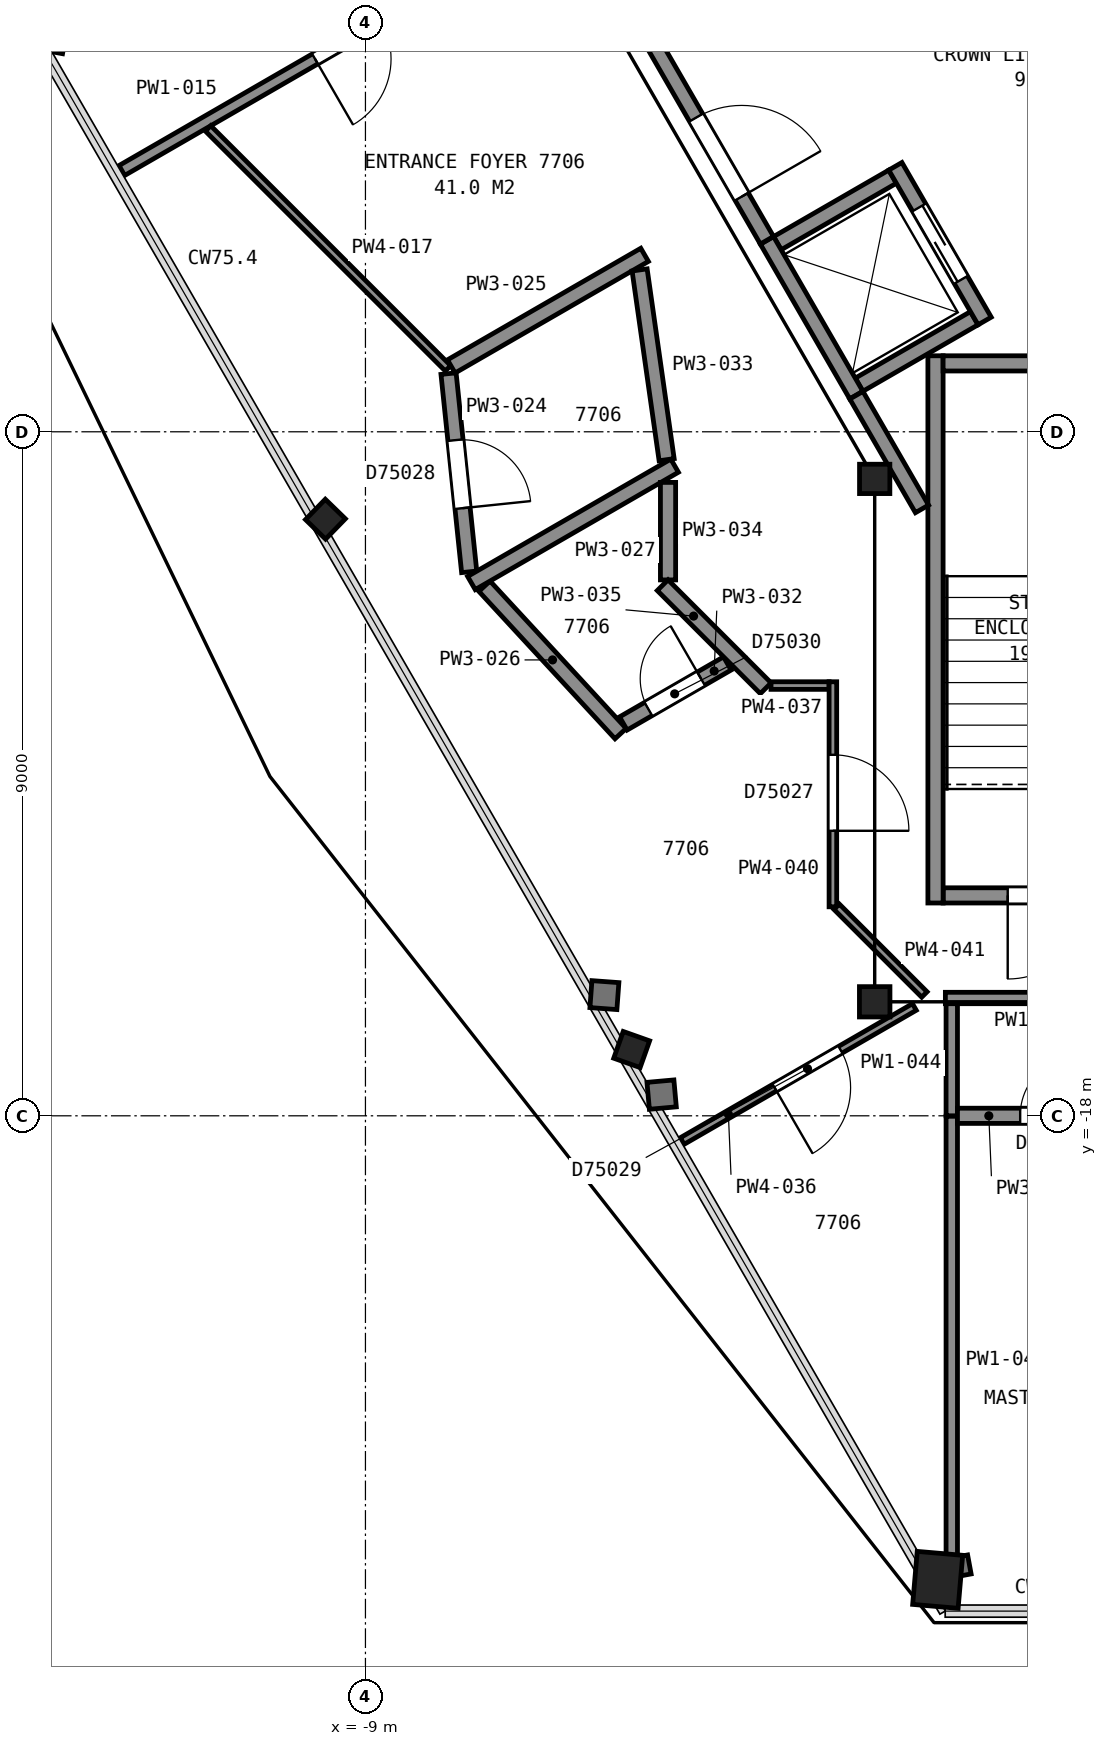
"""IFC4 building model, lengths in metres.
Left out: names, types, materials, properties, quantities, classifications, styles, units other than length and angle.
Written with IfcOpenShell. Run it as: python <this file> out.ifc"""

import sys

from ifc_helpers import new_model, si_unit, direction, frame, frame_2d, origin, origin_2d, place, context, subcontext, project, spatial, rectangle, hollow_rectangle, i_section, extrude, element, fill, save


model = new_model("IFC4")
c1 = context("Model", 3, precision=1e-05, world=origin(), true_north=direction((0.0, 1.0)))
c2 = subcontext(c1, "Body", "Model", "MODEL_VIEW")
j1 = project(units=[si_unit("LENGTHUNIT", "METRE"), si_unit("PLANEANGLEUNIT", "RADIAN")], contexts=[c1])
p1 = place(None, origin())
s1 = spatial("IfcSite", under=j1, at=p1, CompositionType="ELEMENT")
p2 = place(p1, origin())
s2 = spatial("IfcBuilding", under=s1, at=p2, CompositionType="ELEMENT")
p3 = place(p2, frame((0.0, 0.0, 304.7)))
s3 = spatial("IfcBuildingStorey", under=s2, at=p3, CompositionType="ELEMENT", Elevation=304.7)
p4 = place(p3, frame((-9.751, -10.381, 0.045), z_axis=(0.187414704281, 0.192691239229, 0.963195626518), x_axis=(-0.498724706912, 0.863448717299, -0.075696626808)))
e1 = element("IfcColumn", 1, at=p4, inside=s3, PredefinedType="COLUMN", context=c2, shape_type="SweptSolid", body=[
    extrude(i_section(OverallWidth=0.373, OverallDepth=0.368, WebThickness=0.015, FlangeThickness=0.024, FilletRadius=0.015, at=origin_2d()), origin(), (0.0, 0.0, 1.0), 3.748),
])
p5 = place(p3, frame((-5.634, -17.512, 0.055), z_axis=(0.112062196474, 0.31581164461, 0.942181017242), x_axis=(-0.487199113903, 0.843834781896, -0.224899720486)))
e2 = element("IfcColumn", 2, at=p5, inside=s3, PredefinedType="COLUMN", context=c2, shape_type="SweptSolid", body=[
    extrude(i_section(OverallWidth=0.373, OverallDepth=0.368, WebThickness=0.015, FlangeThickness=0.024, FilletRadius=0.015, at=origin_2d()), origin(), (0.0, 0.0, 1.0), 3.81),
])
p6 = place(p3, frame((-1.516, -24.628, 0.09), z_axis=(0.0366924906, 0.425256557728, 0.904328768337), x_axis=(-0.9991793096, 7.5297509e-05, 0.040505574907)))
e3 = element("IfcColumn", 3, at=p6, inside=s3, PredefinedType="COLUMN", context=c2, shape_type="SweptSolid", body=[
    extrude(hollow_rectangle(XDim=0.6, YDim=0.7, WallThickness=0.04, at=origin_2d()), origin(), (0.0, 0.0, 1.0), 3.892),
])
p7 = place(p3, frame((-2.3, -9.62, 0.0), z_axis=(0.0, 0.0, 1.0), x_axis=(1.0, 0.0, 0.0)))
e4 = element("IfcColumn", 4, at=p7, inside=s3, PredefinedType="COLUMN", context=c2, shape_type="SweptSolid", body=[
    extrude(i_section(OverallWidth=0.399, OverallDepth=0.386, WebThickness=0.021, FlangeThickness=0.033, FilletRadius=0.015, at=origin_2d()), origin(), (0.0, 0.0, 1.0), 3.7),
])
p8 = place(p3, frame((-2.3, -16.5, 0.0), z_axis=(0.0, 0.0, 1.0), x_axis=(-1.0, 0.0, 0.0)))
e5 = element("IfcColumn", 5, at=p8, inside=s3, PredefinedType="COLUMN", context=c2, shape_type="SweptSolid", body=[
    extrude(i_section(OverallWidth=0.401, OverallDepth=0.399, WebThickness=0.025, FlangeThickness=0.04, FilletRadius=0.015, at=origin_2d()), origin(), (0.0, 0.0, 1.0), 3.7),
])
p9 = place(p3, frame((-1.4, -15.1, 0.0), z_axis=(0.0, 0.0, 1.0), x_axis=(1.0, 0.0, 0.0)))
e6 = element("IfcWall", 6, at=p9, inside=s3, PredefinedType="PARTITIONING", context=c2, shape_type="SweptSolid", body=[
    extrude(rectangle(XDim=2.8, YDim=0.2, at=frame_2d((1.4, 0.0))), origin(), (0.0, 0.0, 1.0), 3.45),
])
p10 = place(p9, frame((0.85, 0.0, 0.0)))
e7 = element("IfcOpeningElement", 7, at=p10, cuts=e6, PredefinedType="OPENING", context=c2, shape_type="SweptSolid", body=[
    extrude(rectangle(XDim=1.1, YDim=2.1, at=frame_2d((0.55, 1.05))), frame((0.0, 0.11, 0.0), z_axis=(0.0, -1.0, 0.0), x_axis=(1.0, 0.0, 0.0)), (0.0, 0.0, 1.0), 0.22),
])
p11 = place(p3, frame((-1.5, -8.0, 0.0), z_axis=(0.0, 0.0, 1.0), x_axis=(0.0, -1.0, 0.0)))
e8 = element("IfcWall", 8, at=p11, inside=s3, PredefinedType="PARTITIONING", context=c2, shape_type="SweptSolid", body=[
    extrude(rectangle(XDim=7.2, YDim=0.2, at=frame_2d((3.6, 0.0))), origin(), (0.0, 0.0, 1.0), 3.45),
])
p12 = place(p3, frame((-1.4, -8.1, 0.0), z_axis=(0.0, 0.0, 1.0), x_axis=(1.0, 0.0, 0.0)))
e9 = element("IfcWall", 9, at=p12, inside=s3, PredefinedType="PARTITIONING", context=c2, shape_type="SweptSolid", body=[
    extrude(rectangle(XDim=2.8, YDim=0.2, at=frame_2d((1.4, 0.0))), origin(), (0.0, 0.0, 1.0), 3.45),
])
for number, where, z_axis, x_axis in (
    (10, (-2.505, -8.38, 0.0), (0.0, 0.0, 1.0), (0.866, 0.5, 0.0)),
    (11, (-3.58, -6.519, 0.0), (0.0, 0.0, 1.0), (0.866, 0.5, 0.0)),
):
    element("IfcWall", number, at=place(p3, frame(where, z_axis=z_axis, x_axis=x_axis)), inside=s3, PredefinedType="PARTITIONING", context=c2, shape_type="SweptSolid", body=[
        extrude(rectangle(XDim=1.75, YDim=0.2, at=frame_2d((0.875, 0.0))), origin(), (0.0, 0.0, 1.0), 3.7),
    ])
p13 = place(p3, frame((-0.853, -7.542, 0.0), z_axis=(0.0, 0.0, 1.0), x_axis=(-0.500016218704, 0.866016039709, 0.0)))
e12 = element("IfcWall", 12, at=p13, inside=s3, PredefinedType="PARTITIONING", context=c2, shape_type="SweptSolid", body=[
    extrude(rectangle(XDim=2.35, YDim=0.2, at=frame_2d((1.175, 0.0))), origin(), (0.0, 0.0, 1.0), 3.7),
])
p14 = place(p13, frame((0.625, 0.0, 0.0)))
e13 = element("IfcOpeningElement", 13, at=p14, cuts=e12, PredefinedType="OPENING", context=c2, shape_type="SweptSolid", body=[
    extrude(rectangle(XDim=1.1, YDim=2.1, at=frame_2d((0.55, 1.05))), frame((0.0, 0.11, 0.0), z_axis=(0.0, -1.0, 0.0), x_axis=(1.0, 0.0, 0.0)), (0.0, 0.0, 1.0), 0.22),
])
p15 = place(p3, frame((-2.542, -8.517, 0.0), z_axis=(0.0, 0.0, 1.0), x_axis=(-0.500016218704, 0.866016039709, 0.0)))
e14 = element("IfcWall", 14, at=p15, inside=s3, PredefinedType="PARTITIONING", context=c2, shape_type="SweptSolid", body=[
    extrude(rectangle(XDim=2.35, YDim=0.2, at=frame_2d((1.175, 0.0))), origin(), (0.0, 0.0, 1.0), 3.7),
])
p16 = place(p3, frame((-7.141, -0.551, 0.0), z_axis=(0.0, 0.0, 1.0), x_axis=(0.500001302854, -0.86602465158, 0.0)))
e15 = element("IfcWall", 15, at=p16, inside=s3, PredefinedType="PARTITIONING", context=c2, shape_type="SweptSolid", body=[
    extrude(rectangle(XDim=6.846, YDim=0.2, at=frame_2d((3.423, 0.0))), origin(), (0.0, 0.0, 1.0), 3.45),
])
p17 = place(p16, frame((4.983, 0.0, 0.0)))
e16 = element("IfcOpeningElement", 16, at=p17, cuts=e15, PredefinedType="OPENING", context=c2, shape_type="SweptSolid", body=[
    extrude(rectangle(XDim=1.2, YDim=2.1, at=frame_2d((0.6, 1.05))), frame((0.0, 0.11, 0.0), z_axis=(0.0, -1.0, 0.0), x_axis=(1.0, 0.0, 0.0)), (0.0, 0.0, 1.0), 0.22),
])
p18 = place(p3, frame((-2.541, -8.519, 0.0), z_axis=(0.0, 0.0, 1.0), x_axis=(0.500016142392, -0.86601608377, 0.0)))
e17 = element("IfcWall", 17, at=p18, inside=s3, PredefinedType="PARTITIONING", context=c2, shape_type="SweptSolid", body=[
    extrude(rectangle(XDim=1.727, YDim=0.2, at=frame_2d((0.864, 0.0))), origin(), (0.0, 0.0, 1.0), 3.45),
])
p19 = place(p3, frame((-12.205, -5.562, 0.0), z_axis=(0.0, 0.0, 1.0), x_axis=(0.866006351856, 0.500032997455, 0.0)))
e18 = element("IfcWall", 18, at=p19, inside=s3, PredefinedType="PARTITIONING", context=c2, shape_type="SweptSolid", body=[
    extrude(rectangle(XDim=5.671, YDim=0.15, at=frame_2d((2.835, 0.0))), origin(), (0.0, 0.0, 1.0), 2.723),
])
p20 = place(p19, frame((2.935, 0.0, 0.0)))
e19 = element("IfcOpeningElement", 19, at=p20, cuts=e18, PredefinedType="OPENING", context=c2, shape_type="SweptSolid", body=[
    extrude(rectangle(XDim=1.0, YDim=2.1, at=frame_2d((0.5, 1.05))), frame((0.0, 0.085, 0.0), z_axis=(0.0, -1.0, 0.0), x_axis=(1.0, 0.0, 0.0)), (0.0, 0.0, 1.0), 0.17),
])
p21 = place(p3, frame((-11.071, -5.008, 0.0), z_axis=(0.0, 0.0, 1.0), x_axis=(0.707079435951, -0.707134125365, 0.0)))
e20 = element("IfcWall", 20, at=p21, inside=s3, PredefinedType="PARTITIONING", context=c2, shape_type="SweptSolid", body=[
    extrude(rectangle(XDim=4.464, YDim=0.1, at=frame_2d((2.232, 0.0))), origin(), (0.0, 0.0, 1.0), 2.723),
])
p22 = place(p3, frame((-7.907, -8.235, 0.0), z_axis=(0.0, 0.0, 1.0), x_axis=(0.103623353624, -0.994616609847, 0.0)))
e21 = element("IfcWall", 21, at=p22, inside=s3, PredefinedType="PARTITIONING", context=c2, shape_type="SweptSolid", body=[
    extrude(rectangle(XDim=2.622, YDim=0.2, at=frame_2d((1.311, 0.0))), origin(), (0.0, 0.0, 1.0), 2.723),
])
p23 = place(p22, frame((0.88, 0.0, 0.0)))
e22 = element("IfcOpeningElement", 22, at=p23, cuts=e21, PredefinedType="OPENING", context=c2, shape_type="SweptSolid", body=[
    extrude(rectangle(XDim=0.9, YDim=2.1, at=frame_2d((0.45, 1.05))), frame((0.0, 0.11, 0.0), z_axis=(0.0, -1.0, 0.0), x_axis=(1.0, 0.0, 0.0)), (0.0, 0.0, 1.0), 0.22),
])
p24 = place(p3, frame((-7.871, -8.14, 0.0), z_axis=(0.0, 0.0, 1.0), x_axis=(0.866106676517, 0.49985920507, 0.0)))
e23 = element("IfcWall", 23, at=p24, inside=s3, PredefinedType="PARTITIONING", context=c2, shape_type="SweptSolid", body=[
    extrude(rectangle(XDim=2.936, YDim=0.2, at=frame_2d((1.468, 0.0))), origin(), (0.0, 0.0, 1.0), 2.723),
])
p25 = place(p3, frame((-7.434, -11.032, 0.0), z_axis=(0.0, 0.0, 1.0), x_axis=(0.678387636859, -0.734704167782, 0.0)))
e24 = element("IfcWall", 24, at=p25, inside=s3, PredefinedType="PARTITIONING", context=c2, shape_type="SweptSolid", body=[
    extrude(rectangle(XDim=2.64, YDim=0.2, at=frame_2d((1.32, 0.0))), origin(), (0.0, 0.0, 1.0), 2.723),
])
p26 = place(p3, frame((-7.606, -10.99, 0.0), z_axis=(0.0, 0.0, 1.0), x_axis=(0.865956409518, 0.500119482538, 0.0)))
e25 = element("IfcWall", 25, at=p26, inside=s3, PredefinedType="PARTITIONING", context=c2, shape_type="SweptSolid", body=[
    extrude(rectangle(XDim=3.087, YDim=0.2, at=frame_2d((1.543, 0.0))), origin(), (0.0, 0.0, 1.0), 2.723),
])
p27 = place(p3, frame((-5.607, -12.838, 0.0), z_axis=(0.0, 0.0, 1.0), x_axis=(0.866095534226, 0.499878510834, 0.0)))
e26 = element("IfcWall", 26, at=p27, inside=s3, PredefinedType="PARTITIONING", context=c2, shape_type="SweptSolid", body=[
    extrude(rectangle(XDim=1.58, YDim=0.2, at=frame_2d((0.79, 0.0))), origin(), (0.0, 0.0, 1.0), 2.723),
])
p28 = place(p27, frame((0.38, 0.0, 0.0)))
e27 = element("IfcOpeningElement", 27, at=p28, cuts=e26, PredefinedType="OPENING", context=c2, shape_type="SweptSolid", body=[
    extrude(rectangle(XDim=0.8, YDim=2.1, at=frame_2d((0.4, 1.05))), frame((0.0, 0.11, 0.0), z_axis=(0.0, -1.0, 0.0), x_axis=(1.0, 0.0, 0.0)), (0.0, 0.0, 1.0), 0.22),
])
p29 = place(p3, frame((-5.393, -6.871, 0.0), z_axis=(0.0, 0.0, 1.0), x_axis=(0.140960508483, -0.990015219604, 0.0)))
e28 = element("IfcWall", 28, at=p29, inside=s3, PredefinedType="PARTITIONING", context=c2, shape_type="SweptSolid", body=[
    extrude(rectangle(XDim=2.522, YDim=0.2, at=frame_2d((1.261, 0.0))), origin(), (0.0, 0.0, 1.0), 2.723),
])
p30 = place(p3, frame((-5.019, -10.949, 0.0), z_axis=(0.0, 0.0, 1.0), x_axis=(0.0, 1.0, 0.0)))
e29 = element("IfcWall", 29, at=p30, inside=s3, PredefinedType="PARTITIONING", context=c2, shape_type="SweptSolid", body=[
    extrude(rectangle(XDim=1.283, YDim=0.2, at=frame_2d((0.642, 0.0))), origin(), (0.0, 0.0, 1.0), 2.723),
])
p31 = place(p3, frame((-5.09, -11.018, 0.0), z_axis=(0.0, 0.0, 1.0), x_axis=(0.707106781187, -0.707106781187, 0.0)))
e30 = element("IfcWall", 30, at=p31, inside=s3, PredefinedType="PARTITIONING", context=c2, shape_type="SweptSolid", body=[
    extrude(rectangle(XDim=1.918, YDim=0.2, at=frame_2d((0.959, 0.0))), origin(), (0.0, 0.0, 1.0), 2.723),
])
p32 = place(p3, frame((-1.778, -16.568, 0.0), z_axis=(0.0, 0.0, 1.0), x_axis=(-0.866019606374, -0.500010041276, 0.0)))
e31 = element("IfcWall", 31, at=p32, inside=s3, PredefinedType="PARTITIONING", context=c2, shape_type="SweptSolid", body=[
    extrude(rectangle(XDim=3.527, YDim=0.1, at=frame_2d((1.764, 0.0))), origin(), (0.0, 0.0, 1.0), 2.723),
])
p33 = place(p32, frame((1.124, 0.0, 0.0)))
e32 = element("IfcOpeningElement", 32, at=p33, cuts=e31, PredefinedType="OPENING", context=c2, shape_type="SweptSolid", body=[
    extrude(rectangle(XDim=1.0, YDim=2.1, at=frame_2d((0.5, 1.05))), frame((0.0, 0.06, 0.0), z_axis=(0.0, -1.0, 0.0), x_axis=(1.0, 0.0, 0.0)), (0.0, 0.0, 1.0), 0.12),
])
p34 = place(p3, frame((-3.664, -12.339, 0.0), z_axis=(0.0, 0.0, 1.0), x_axis=(1.0, 0.0, 0.0)))
e33 = element("IfcWall", 33, at=p34, inside=s3, PredefinedType="PARTITIONING", context=c2, shape_type="SweptSolid", body=[
    extrude(rectangle(XDim=0.764, YDim=0.1, at=frame_2d((0.382, 0.0))), origin(), (0.0, 0.0, 1.0), 2.723),
])
p35 = place(p3, frame((-2.85, -15.25, 0.0), z_axis=(0.0, 0.0, 1.0), x_axis=(0.0, 1.0, 0.0)))
e34 = element("IfcWall", 34, at=p35, inside=s3, PredefinedType="PARTITIONING", context=c2, shape_type="SweptSolid", body=[
    extrude(rectangle(XDim=2.961, YDim=0.1, at=frame_2d((1.48, 0.0))), origin(), (0.0, 0.0, 1.0), 2.723),
])
p36 = place(p35, frame((1.0, 0.0, 0.0)))
e35 = element("IfcOpeningElement", 35, at=p36, cuts=e34, PredefinedType="OPENING", context=c2, shape_type="SweptSolid", body=[
    extrude(rectangle(XDim=1.0, YDim=2.1, at=frame_2d((0.5, 1.05))), frame((0.0, 0.06, 0.0), z_axis=(0.0, -1.0, 0.0), x_axis=(1.0, 0.0, 0.0)), (0.0, 0.0, 1.0), 0.12),
])
p37 = place(p3, frame((-2.801, -15.25, 0.0), z_axis=(0.0, 0.0, 1.0), x_axis=(0.707181547962, -0.707032006505, 0.0)))
e36 = element("IfcWall", 36, at=p37, inside=s3, PredefinedType="PARTITIONING", context=c2, shape_type="SweptSolid", body=[
    extrude(rectangle(XDim=1.633, YDim=0.1, at=frame_2d((0.816, 0.0))), origin(), (0.0, 0.0, 1.0), 2.723),
])
p38 = place(p3, frame((-1.37, -16.45, 0.0), z_axis=(0.0, 0.0, 1.0), x_axis=(1.0, 0.0, 0.0)))
e37 = element("IfcWall", 37, at=p38, inside=s3, PredefinedType="PARTITIONING", context=c2, shape_type="SweptSolid", body=[
    extrude(rectangle(XDim=2.345, YDim=0.15, at=frame_2d((1.173, 0.0))), origin(), (0.0, 0.0, 1.0), 2.723),
])
p39 = place(p3, frame((-1.286, -24.421, 0.0), z_axis=(0.0, 0.0, 1.0), x_axis=(0.0, 1.0, 0.0)))
e38 = element("IfcWall", 38, at=p39, inside=s3, PredefinedType="PARTITIONING", context=c2, shape_type="SweptSolid", body=[
    extrude(rectangle(XDim=6.416, YDim=0.15, at=frame_2d((3.208, 0.0))), origin(), (0.0, 0.0, 1.0), 2.723),
])
p40 = place(p3, frame((-1.286, -18.0, 0.0), z_axis=(0.0, 0.0, 1.0), x_axis=(0.0, 1.0, 0.0)))
e39 = element("IfcWall", 39, at=p40, inside=s3, PredefinedType="PARTITIONING", context=c2, shape_type="SweptSolid", body=[
    extrude(rectangle(XDim=1.475, YDim=0.15, at=frame_2d((0.738, 0.0))), origin(), (0.0, 0.0, 1.0), 2.723),
])
p41 = place(p3, frame((-1.211, -18.0, 0.0), z_axis=(0.0, 0.0, 1.0), x_axis=(1.0, 0.0, 0.0)))
e40 = element("IfcWall", 40, at=p41, inside=s3, PredefinedType="PARTITIONING", context=c2, shape_type="SweptSolid", body=[
    extrude(rectangle(XDim=2.411, YDim=0.2, at=frame_2d((1.206, 0.0))), origin(), (0.0, 0.0, 1.0), 2.723),
])
p42 = place(p41, frame((0.825, 0.0, 0.0)))
e41 = element("IfcOpeningElement", 41, at=p42, cuts=e40, PredefinedType="OPENING", context=c2, shape_type="SweptSolid", body=[
    extrude(rectangle(XDim=0.8, YDim=2.1, at=frame_2d((0.4, 1.05))), frame((0.0, 0.11, 0.0), z_axis=(0.0, -1.0, 0.0), x_axis=(1.0, 0.0, 0.0)), (0.0, 0.0, 1.0), 0.22),
])
p43 = place(p10, origin())
e42 = element("IfcDoor", 42, at=p43, inside=s3, OperationType="SINGLE_SWING_LEFT", PredefinedType="DOOR", context=c2, shape_type="SweptSolid", body=[
    extrude(rectangle(XDim=1.1, YDim=2.1, at=frame_2d((0.55, 1.05))), frame((0.0, 0.025, 0.0), z_axis=(0.0, -1.0, 0.0), x_axis=(1.0, 0.0, 0.0)), (0.0, 0.0, 1.0), 0.05),
])
fill(e7, e42)
p44 = place(p14, origin())
e43 = element("IfcDoor", 43, at=p44, inside=s3, OperationType="SLIDING_TO_LEFT", PredefinedType="DOOR", context=c2, shape_type="SweptSolid", body=[
    extrude(rectangle(XDim=1.1, YDim=2.1, at=frame_2d((0.55, 1.05))), frame((0.0, 0.025, 0.0), z_axis=(0.0, -1.0, 0.0), x_axis=(1.0, 0.0, 0.0)), (0.0, 0.0, 1.0), 0.05),
])
fill(e13, e43)
p45 = place(p17, origin())
e44 = element("IfcDoor", 44, at=p45, inside=s3, OperationType="SINGLE_SWING_RIGHT", PredefinedType="DOOR", context=c2, shape_type="SweptSolid", body=[
    extrude(rectangle(XDim=1.2, YDim=2.1, at=frame_2d((0.6, 1.05))), frame((0.0, 0.025, 0.0), z_axis=(0.0, -1.0, 0.0), x_axis=(1.0, 0.0, 0.0)), (0.0, 0.0, 1.0), 0.05),
])
fill(e16, e44)
p46 = place(p20, origin())
e45 = element("IfcDoor", 45, at=p46, inside=s3, OperationType="SINGLE_SWING_LEFT", PredefinedType="DOOR", context=c2, shape_type="SweptSolid", body=[
    extrude(rectangle(XDim=1.0, YDim=2.1, at=frame_2d((0.5, 1.05))), frame((0.0, 0.025, 0.0), z_axis=(0.0, -1.0, 0.0), x_axis=(1.0, 0.0, 0.0)), (0.0, 0.0, 1.0), 0.05),
])
fill(e19, e45)
p47 = place(p23, origin())
e46 = element("IfcDoor", 46, at=p47, inside=s3, OperationType="SINGLE_SWING_RIGHT", PredefinedType="DOOR", context=c2, shape_type="SweptSolid", body=[
    extrude(rectangle(XDim=0.9, YDim=2.1, at=frame_2d((0.45, 1.05))), frame((0.0, 0.025, 0.0), z_axis=(0.0, -1.0, 0.0), x_axis=(1.0, 0.0, 0.0)), (0.0, 0.0, 1.0), 0.05),
])
fill(e22, e46)
p48 = place(p28, origin())
e47 = element("IfcDoor", 47, at=p48, inside=s3, OperationType="SINGLE_SWING_RIGHT", PredefinedType="DOOR", context=c2, shape_type="SweptSolid", body=[
    extrude(rectangle(XDim=0.8, YDim=2.1, at=frame_2d((0.4, 1.05))), frame((0.0, 0.025, 0.0), z_axis=(0.0, -1.0, 0.0), x_axis=(1.0, 0.0, 0.0)), (0.0, 0.0, 1.0), 0.05),
])
fill(e27, e47)
p49 = place(p33, origin())
e48 = element("IfcDoor", 48, at=p49, inside=s3, OperationType="SINGLE_SWING_RIGHT", PredefinedType="DOOR", context=c2, shape_type="SweptSolid", body=[
    extrude(rectangle(XDim=1.0, YDim=2.1, at=frame_2d((0.5, 1.05))), frame((0.0, 0.025, 0.0), z_axis=(0.0, -1.0, 0.0), x_axis=(1.0, 0.0, 0.0)), (0.0, 0.0, 1.0), 0.05),
])
fill(e32, e48)
p50 = place(p36, origin())
e49 = element("IfcDoor", 49, at=p50, inside=s3, OperationType="SINGLE_SWING_LEFT", PredefinedType="DOOR", context=c2, shape_type="SweptSolid", body=[
    extrude(rectangle(XDim=1.0, YDim=2.1, at=frame_2d((0.5, 1.05))), frame((0.0, 0.025, 0.0), z_axis=(0.0, -1.0, 0.0), x_axis=(1.0, 0.0, 0.0)), (0.0, 0.0, 1.0), 0.05),
])
fill(e35, e49)
p51 = place(p42, origin())
e50 = element("IfcDoor", 50, at=p51, inside=s3, OperationType="SINGLE_SWING_RIGHT", PredefinedType="DOOR", context=c2, shape_type="SweptSolid", body=[
    extrude(rectangle(XDim=0.8, YDim=2.1, at=frame_2d((0.4, 1.05))), frame((0.0, 0.025, 0.0), z_axis=(0.0, -1.0, 0.0), x_axis=(1.0, 0.0, 0.0)), (0.0, 0.0, 1.0), 0.05),
])
fill(e41, e50)
save(model, sys.argv[1])
